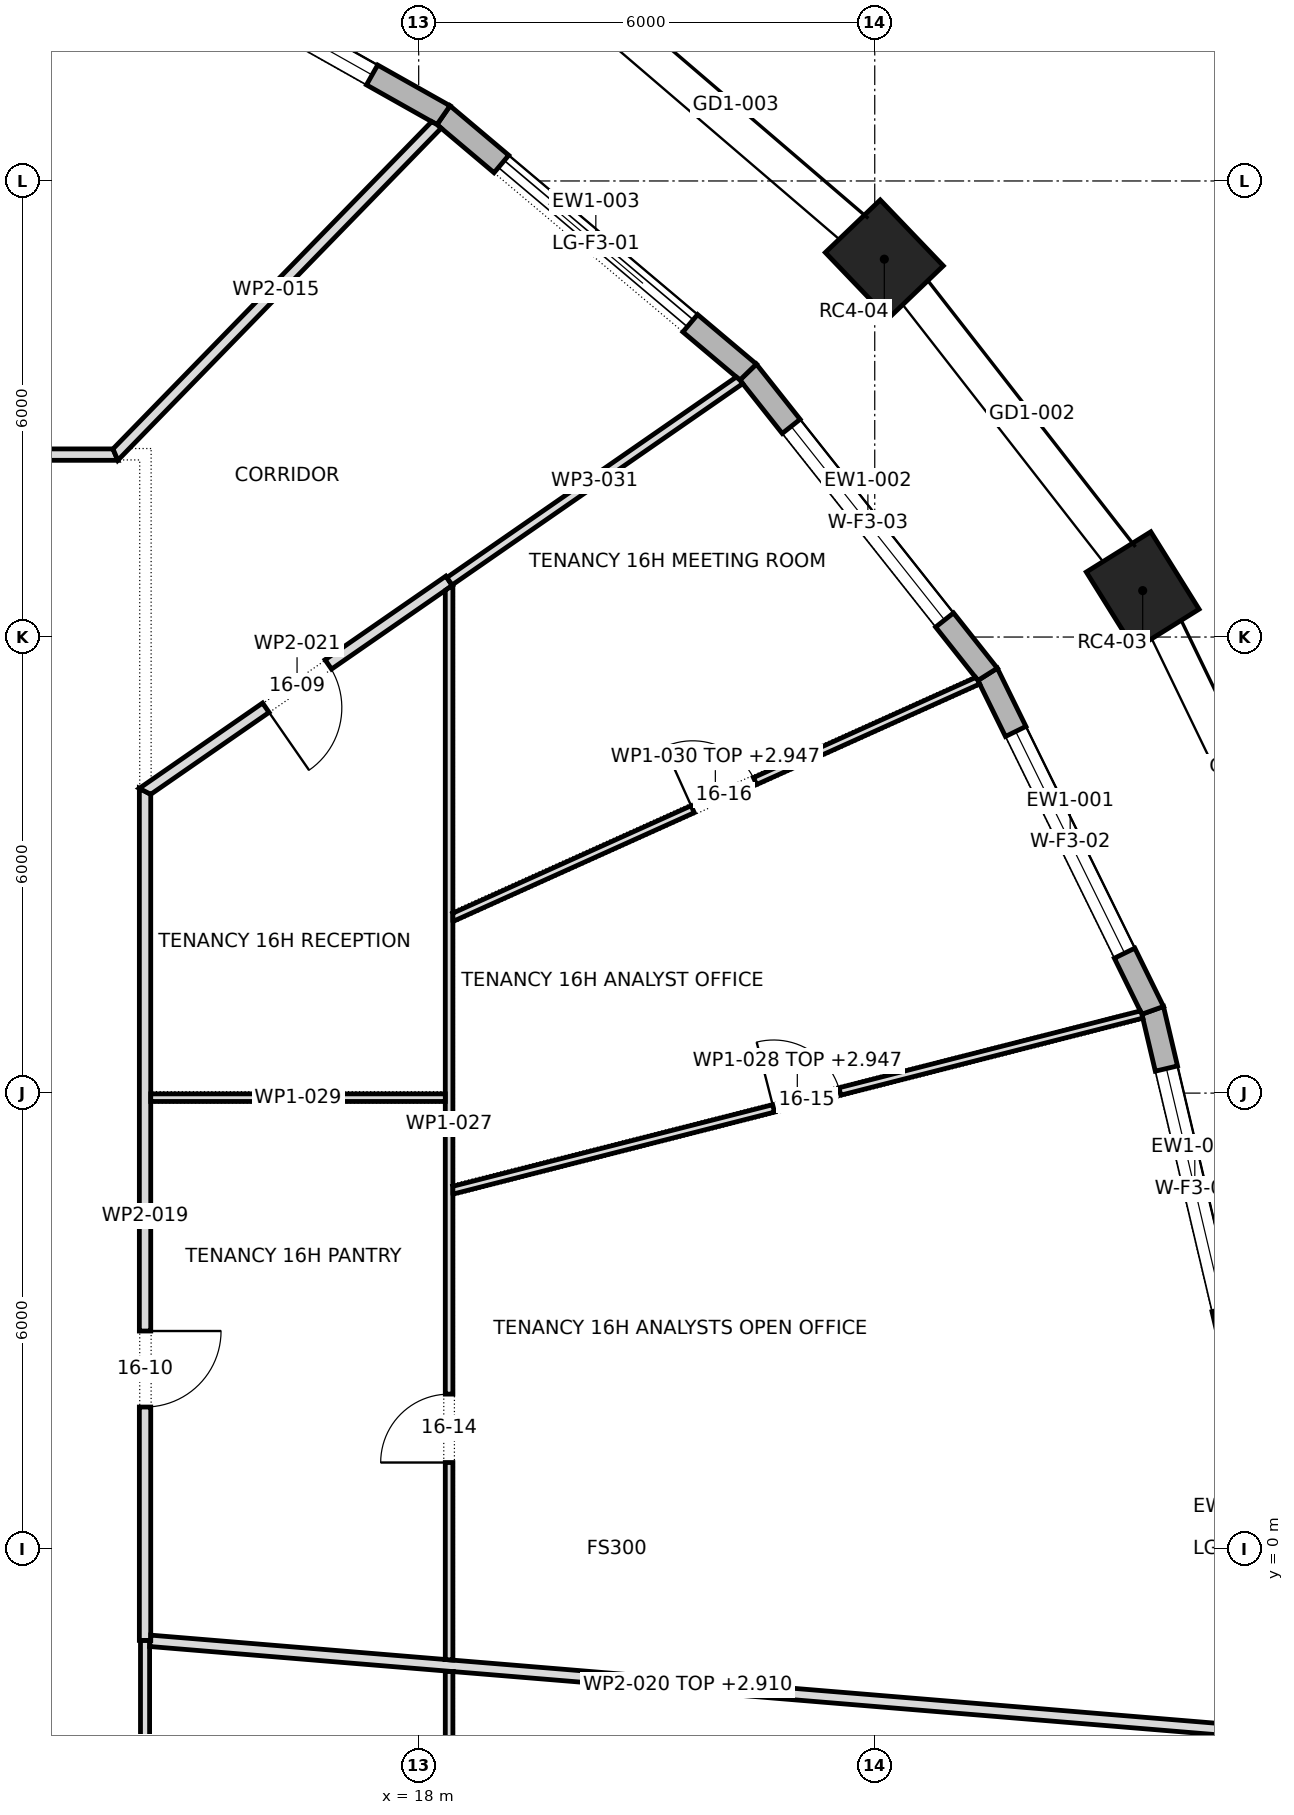
"""IFC4 building model, lengths in metres.
Left out: names, types, materials, properties, quantities, classifications, styles, units other than length and angle.
Written with IfcOpenShell. Run it as: python <this file> out.ifc"""

import sys

from ifc_helpers import new_model, si_unit, direction, frame, frame_2d, origin, origin_2d, place, context, subcontext, project, spatial, polyline, rectangle, outline, extrude, element, fill, save


model = new_model("IFC4")
c1 = context("Model", 3, precision=1e-05, world=origin(), true_north=direction((0.0, 1.0)))
c2 = subcontext(c1, "Body", "Model", "MODEL_VIEW")
j1 = project(units=[si_unit("LENGTHUNIT", "METRE"), si_unit("PLANEANGLEUNIT", "RADIAN")], contexts=[c1])
p1 = place(None, origin())
s1 = spatial("IfcSite", under=j1, at=p1, CompositionType="ELEMENT")
p2 = place(p1, origin())
s2 = spatial("IfcBuilding", under=s1, at=p2, CompositionType="ELEMENT")
p3 = place(p2, frame((0.0, 0.0, 234.9)))
s3 = spatial("IfcBuildingStorey", under=s2, at=p3, CompositionType="ELEMENT", Elevation=234.9)
for number, where, z_axis, x_axis in (
    (1, (27.525, 12.611, 0.0), (0.0, 0.0, 1.0), (-0.529, 0.849, 0.0)),
    (2, (24.126, 16.971, 0.0), (0.0, 0.0, 1.0), (-0.692, 0.722, 0.0)),
):
    element("IfcColumn", number, at=place(p3, frame(where, z_axis=z_axis, x_axis=x_axis)), inside=s3, PredefinedType="COLUMN", context=c2, shape_type="SweptSolid", body=[
        extrude(rectangle(XDim=1.2, YDim=1.0, at=origin_2d()), origin(), (0.0, 0.0, 1.0), 4.0),
    ])
p4 = place(p3, frame((28.764, 2.394, 0.0), z_axis=(0.0, 0.0, 1.0), x_axis=(-0.229617574796, 0.97328093033, 0.0)))
e3 = element("IfcWall", 3, at=p4, inside=s3, PredefinedType="STANDARD", context=c2, shape_type="SweptSolid", body=[
    extrude(outline(polyline([(-0.017, -0.15), (4.841, -0.15), (4.807, 0.15), (0.017, 0.15), (-0.017, -0.15)])), origin(), (0.0, 0.0, 1.0), 3.7),
])
p5 = place(p4, frame((0.787, 0.0, 0.6)))
e4 = element("IfcOpeningElement", 4, at=p5, cuts=e3, PredefinedType="OPENING", context=c2, shape_type="SweptSolid", body=[
    extrude(rectangle(XDim=3.25, YDim=2.65, at=frame_2d((1.625, 1.325))), frame((0.0, 0.162, 0.0), z_axis=(0.0, -1.0, 0.0), x_axis=(1.0, 0.0, 0.0)), (0.0, 0.0, 1.0), 0.324),
])
p6 = place(p3, frame((27.656, 7.089, 0.0), z_axis=(0.0, 0.0, 1.0), x_axis=(-0.440857641837, 0.897577038272, 0.0)))
e5 = element("IfcWall", 5, at=p6, inside=s3, PredefinedType="STANDARD", context=c2, shape_type="SweptSolid", body=[
    extrude(outline(polyline([(-0.017, -0.15), (4.941, -0.15), (4.909, 0.15), (0.017, 0.15), (-0.017, -0.15)])), origin(), (0.0, 0.0, 1.0), 3.7),
])
p7 = place(p6, frame((0.838, 0.0, 0.6)))
e6 = element("IfcOpeningElement", 6, at=p7, cuts=e5, PredefinedType="OPENING", context=c2, shape_type="SweptSolid", body=[
    extrude(rectangle(XDim=3.25, YDim=2.65, at=frame_2d((1.625, 1.325))), frame((0.0, 0.162, 0.0), z_axis=(0.0, -1.0, 0.0), x_axis=(1.0, 0.0, 0.0)), (0.0, 0.0, 1.0), 0.324),
])
p8 = place(p3, frame((25.485, 11.51, 0.0), z_axis=(0.0, 0.0, 1.0), x_axis=(-0.621084984443, 0.783743224596, 0.0)))
e7 = element("IfcWall", 7, at=p8, inside=s3, PredefinedType="STANDARD", context=c2, shape_type="SweptSolid", body=[
    extrude(outline(polyline([(-0.016, -0.15), (5.088, -0.15), (5.058, 0.15), (0.016, 0.15), (-0.016, -0.15)])), origin(), (0.0, 0.0, 1.0), 3.7),
])
p9 = place(p8, frame((0.912, 0.0, 0.6)))
e8 = element("IfcOpeningElement", 8, at=p9, cuts=e7, PredefinedType="OPENING", context=c2, shape_type="SweptSolid", body=[
    extrude(rectangle(XDim=3.25, YDim=2.65, at=frame_2d((1.625, 1.325))), frame((0.0, 0.162, 0.0), z_axis=(0.0, -1.0, 0.0), x_axis=(1.0, 0.0, 0.0)), (0.0, 0.0, 1.0), 0.324),
])
p10 = place(p3, frame((22.334, 15.486, 0.0), z_axis=(0.0, 0.0, 1.0), x_axis=(-0.764475071601, 0.644653290459, 0.0)))
e9 = element("IfcWall", 9, at=p10, inside=s3, PredefinedType="STANDARD", context=c2, shape_type="SweptSolid", body=[
    extrude(outline(polyline([(-0.015, -0.15), (5.257, -0.15), (5.229, 0.15), (0.015, 0.15), (-0.015, -0.15)])), origin(), (0.0, 0.0, 1.0), 3.7),
])
p11 = place(p10, frame((0.996, 0.0, 0.0)))
e10 = element("IfcOpeningElement", 10, at=p11, cuts=e9, PredefinedType="OPENING", context=c2, shape_type="SweptSolid", body=[
    extrude(rectangle(XDim=3.25, YDim=3.25, at=frame_2d((1.625, 1.625))), frame((0.0, 0.162, 0.0), z_axis=(0.0, -1.0, 0.0), x_axis=(1.0, 0.0, 0.0)), (0.0, 0.0, 1.0), 0.324),
])
p12 = place(p3, frame((18.326, 18.865, 0.0), z_axis=(0.0, 0.0, 1.0), x_axis=(-0.871225596594, 0.490882837181, 0.0)))
e11 = element("IfcWall", 11, at=p12, inside=s3, PredefinedType="STANDARD", context=c2, shape_type="SweptSolid", body=[
    extrude(outline(polyline([(-0.014, -0.15), (5.42, -0.15), (5.393, 0.15), (0.014, 0.15), (-0.014, -0.15)])), origin(), (0.0, 0.0, 1.0), 3.7),
])
p13 = place(p12, frame((1.078, 0.0, 0.6)))
e12 = element("IfcOpeningElement", 12, at=p13, cuts=e11, PredefinedType="OPENING", context=c2, shape_type="SweptSolid", body=[
    extrude(rectangle(XDim=3.25, YDim=2.65, at=frame_2d((1.625, 1.325))), frame((0.0, 0.162, 0.0), z_axis=(0.0, -1.0, 0.0), x_axis=(1.0, 0.0, 0.0)), (0.0, 0.0, 1.0), 0.324),
])
p14 = place(p3, frame((27.656, -7.089, 0.0), z_axis=(0.0, 0.0, 1.0), x_axis=(0.229617574796, 0.97328093033, 0.0)))
e13 = element("IfcWall", 13, at=p14, inside=s3, PredefinedType="STANDARD", context=c2, shape_type="SweptSolid", body=[
    extrude(outline(polyline([(-0.017, -0.15), (4.841, -0.15), (4.807, 0.15), (0.017, 0.15), (-0.017, -0.15)])), origin(), (0.0, 0.0, 1.0), 3.7),
])
p15 = place(p14, frame((0.787, 0.0, 0.6)))
e14 = element("IfcOpeningElement", 14, at=p15, cuts=e13, PredefinedType="OPENING", context=c2, shape_type="SweptSolid", body=[
    extrude(rectangle(XDim=3.25, YDim=2.65, at=frame_2d((1.625, 1.325))), frame((0.0, 0.162, 0.0), z_axis=(0.0, -1.0, 0.0), x_axis=(1.0, 0.0, 0.0)), (0.0, 0.0, 1.0), 0.324),
])
p16 = place(p3, frame((-14.042, 14.4, 0.0), z_axis=(0.0, 0.0, 1.0), x_axis=(1.0, 0.0, 0.0)))
e15 = element("IfcWall", 15, at=p16, inside=s3, PredefinedType="PARTITIONING", context=c2, shape_type="SweptSolid", body=[
    extrude(outline(polyline([(0.0, -0.075), (1.872, -0.075), (3.745, -0.075), (5.617, -0.075), (7.489, -0.075), (9.361, -0.075), (11.233, -0.075), (13.106, -0.075), (14.978, -0.075), (16.85, -0.075), (18.722, -0.075), (20.594, -0.075), (22.467, -0.075), (24.339, -0.075), (26.211, -0.075), (28.083, -0.075), (28.02, 0.075), (26.023, 0.075), (24.026, 0.075), (22.029, 0.075), (20.032, 0.075), (18.036, 0.075), (16.039, 0.075), (14.042, 0.075), (12.045, 0.075), (10.048, 0.075), (8.051, 0.075), (6.054, 0.075), (4.057, 0.075), (2.06, 0.075), (0.063, 0.075), (0.0, -0.075)])), origin(), (0.0, 0.0, 1.0), 3.7),
])
p17 = place(p16, frame((13.142, 0.0, 0.0)))
e16 = element("IfcOpeningElement", 16, at=p17, cuts=e15, PredefinedType="OPENING", context=c2, shape_type="SweptSolid", body=[
    extrude(rectangle(XDim=1.8, YDim=2.1, at=frame_2d((0.9, 1.05))), frame((0.0, 0.087, 0.0), z_axis=(0.0, -1.0, 0.0), x_axis=(1.0, 0.0, 0.0)), (0.0, 0.0, 1.0), 0.174),
])
p18 = place(p3, frame((13.988, 14.377, 0.0), z_axis=(0.0, 0.0, 1.0), x_axis=(0.697616683155, 0.716471188105, 0.0)))
e17 = element("IfcWall", 17, at=p18, inside=s3, PredefinedType="PARTITIONING", context=c2, shape_type="SweptSolid", body=[
    extrude(outline(polyline([(6.099, -0.075), (6.099, -0.073), (6.094, -0.002), (6.073, 0.075), (4.571, 0.075), (3.068, 0.075), (1.566, 0.075), (0.063, 0.075), (0.032, 0.0), (0.0, -0.075), (1.525, -0.075), (3.05, -0.075), (4.574, -0.075), (6.099, -0.075)])), origin(), (0.0, 0.0, 1.0), 3.7),
])
p19 = place(p3, frame((14.4, -1.2, 0.0), z_axis=(0.0, 0.0, 1.0), x_axis=(0.0, -1.0, 0.0)))
e18 = element("IfcWall", 18, at=p19, inside=s3, PredefinedType="PARTITIONING", context=c2, shape_type="SweptSolid", body=[
    extrude(rectangle(XDim=3.9, YDim=0.12, at=frame_2d((1.95, 0.0))), origin(), (0.0, 0.0, 1.0), 3.7),
])
p20 = place(p19, frame((1.45, 0.0, 0.0)))
e19 = element("IfcOpeningElement", 19, at=p20, cuts=e18, PredefinedType="OPENING", context=c2, shape_type="SweptSolid", body=[
    extrude(rectangle(XDim=1.0, YDim=2.1, at=frame_2d((0.5, 1.05))), frame((0.0, 0.072, 0.0), z_axis=(0.0, -1.0, 0.0), x_axis=(1.0, 0.0, 0.0)), (0.0, 0.0, 1.0), 0.144),
])
p21 = place(p3, frame((14.4, -1.2, 0.0), z_axis=(0.0, 0.0, 1.0), x_axis=(0.0, 1.0, 0.0)))
e20 = element("IfcWall", 20, at=p21, inside=s3, PredefinedType="PARTITIONING", context=c2, shape_type="SweptSolid", body=[
    extrude(outline(polyline([(0.0, -0.075), (1.855, -0.075), (3.71, -0.075), (5.565, -0.075), (7.42, -0.075), (9.276, -0.075), (11.131, -0.075), (11.209, 0.075), (11.209, 0.075), (9.341, 0.075), (7.473, 0.075), (5.604, 0.075), (3.736, 0.075), (1.868, 0.075), (0.0, 0.075), (0.0, -0.075)])), origin(), (0.0, 0.0, 1.0), 3.7),
])
p22 = place(p21, frame((3.07, 0.0, 0.0)))
e21 = element("IfcOpeningElement", 21, at=p22, cuts=e20, PredefinedType="OPENING", context=c2, shape_type="SweptSolid", body=[
    extrude(rectangle(XDim=1.0, YDim=2.1, at=frame_2d((0.5, 1.05))), frame((0.0, 0.087, 0.0), z_axis=(0.0, -1.0, 0.0), x_axis=(1.0, 0.0, 0.0)), (0.0, 0.0, 1.0), 0.174),
])
p23 = place(p3, frame((14.466, -1.206, 0.0), z_axis=(0.0, 0.0, 1.0), x_axis=(0.996598124583, -0.082414671491, 0.0)))
e22 = element("IfcWall", 22, at=p23, inside=s3, PredefinedType="PARTITIONING", context=c2, shape_type="SweptSolid", body=[
    extrude(outline(polyline([(0.0, -0.075), (1.334, -0.075), (2.667, -0.075), (4.001, -0.075), (4.003, -0.075), (4.003, -0.075), (5.7, -0.075), (7.397, -0.075), (9.094, -0.075), (10.791, -0.075), (12.488, -0.075), (14.185, -0.075), (14.19, -0.044), (14.19, 0.075), (12.475, 0.075), (10.761, 0.075), (9.046, 0.075), (7.332, 0.075), (5.617, 0.075), (3.903, 0.075), (3.891, 0.074), (3.891, 0.075), (1.947, 0.075), (0.002, 0.075), (0.008, 0.006), (0.0, 0.006), (0.0, -0.075)])), origin(), (0.0, 0.0, 1.0), 2.91),
])
p24 = place(p3, frame((14.368, 9.948, 0.0), z_axis=(0.0, 0.0, 1.0), x_axis=(0.822102584422, 0.56933938972, 0.0)))
e23 = element("IfcWall", 23, at=p24, inside=s3, PredefinedType="PARTITIONING", context=c2, shape_type="SweptSolid", body=[
    extrude(outline(polyline([(4.905, 0.075), (3.27, 0.075), (1.635, 0.075), (0.0, 0.075), (0.079, -0.075), (1.688, -0.075), (3.296, -0.075), (4.905, -0.075), (4.905, 0.075)])), origin(), (0.0, 0.0, 1.0), 3.7),
])
p25 = place(p24, frame((1.972, 0.0, 0.0)))
e24 = element("IfcOpeningElement", 24, at=p25, cuts=e23, PredefinedType="OPENING", context=c2, shape_type="SweptSolid", body=[
    extrude(rectangle(XDim=1.0, YDim=2.1, at=frame_2d((0.5, 1.05))), frame((0.0, 0.087, 0.0), z_axis=(0.0, -1.0, 0.0), x_axis=(1.0, 0.0, 0.0)), (0.0, 0.0, 1.0), 0.174),
])
p26 = place(p3, frame((18.4, -12.73, 0.0), z_axis=(0.0, 0.0, 1.0), x_axis=(0.0, 1.0, 0.0)))
e25 = element("IfcWall", 25, at=p26, inside=s3, PredefinedType="PARTITIONING", context=c2, shape_type="SweptSolid", body=[
    extrude(rectangle(XDim=11.12, YDim=0.1, at=frame_2d((5.56, 0.0))), origin(), (0.0, 0.0, 1.0), 3.7),
])
p27 = place(p26, frame((3.365, 0.0, 0.0)))
e26 = element("IfcOpeningElement", 26, at=p27, cuts=e25, PredefinedType="OPENING", context=c2, shape_type="SweptSolid", body=[
    extrude(rectangle(XDim=0.9, YDim=2.1, at=frame_2d((0.45, 1.05))), frame((0.0, 0.062, 0.0), z_axis=(0.0, -1.0, 0.0), x_axis=(1.0, 0.0, 0.0)), (0.0, 0.0, 1.0), 0.124),
])
p28 = place(p3, frame((18.4, -1.459, 0.0), z_axis=(0.0, 0.0, 1.0), x_axis=(0.0, 1.0, 0.0)))
e27 = element("IfcWall", 27, at=p28, inside=s3, PredefinedType="PARTITIONING", context=c2, shape_type="SweptSolid", body=[
    extrude(outline(polyline([(0.0, -0.05), (1.557, -0.05), (3.113, -0.05), (4.67, -0.05), (6.227, -0.05), (6.233, -0.048), (6.234, -0.05), (8.027, -0.05), (9.821, -0.05), (9.826, -0.048), (9.827, -0.05), (11.268, -0.05), (12.709, -0.05), (14.151, -0.05), (14.151, -0.05), (14.145, -0.04), (14.151, -0.036), (14.151, -0.034), (14.138, -0.043), (14.073, 0.05), (12.417, 0.05), (10.761, 0.05), (9.105, 0.05), (7.449, 0.05), (7.449, 0.05), (7.349, 0.05), (7.349, 0.05), (5.514, 0.05), (3.679, 0.05), (1.844, 0.05), (0.008, 0.05), (0.0, -0.048), (0.0, -0.05)])), origin(), (0.0, 0.0, 1.0), 3.7),
])
p29 = place(p28, frame((2.6, 0.0, 0.0)))
e28 = element("IfcOpeningElement", 28, at=p29, cuts=e27, PredefinedType="OPENING", context=c2, shape_type="SweptSolid", body=[
    extrude(rectangle(XDim=0.9, YDim=2.1, at=frame_2d((0.45, 1.05))), frame((0.0, 0.062, 0.0), z_axis=(0.0, -1.0, 0.0), x_axis=(1.0, 0.0, 0.0)), (0.0, 0.0, 1.0), 0.124),
])
p30 = place(p3, frame((18.438, 4.719, 0.0), z_axis=(0.0, 0.0, 1.0), x_axis=(0.968975503795, 0.247156778269, 0.0)))
e29 = element("IfcWall", 29, at=p30, inside=s3, PredefinedType="PARTITIONING", context=c2, shape_type="SweptSolid", body=[
    extrude(outline(polyline([(9.367, -0.05), (9.367, 0.008), (9.358, 0.05), (7.492, 0.05), (5.625, 0.05), (3.759, 0.05), (1.892, 0.05), (0.025, 0.05), (0.0, -0.05), (0.0, -0.05), (1.874, -0.05), (3.747, -0.05), (5.62, -0.05), (7.494, -0.05), (9.367, -0.05)])), origin(), (0.0, 0.0, 1.0), 2.947),
])
p31 = place(p30, frame((4.367, 0.0, 0.0)))
e30 = element("IfcOpeningElement", 30, at=p31, cuts=e29, PredefinedType="OPENING", context=c2, shape_type="SweptSolid", body=[
    extrude(rectangle(XDim=0.9, YDim=2.1, at=frame_2d((0.45, 1.05))), frame((0.0, 0.062, 0.0), z_axis=(0.0, -1.0, 0.0), x_axis=(1.0, 0.0, 0.0)), (0.0, 0.0, 1.0), 0.124),
])
p32 = place(p3, frame((18.35, 5.94, 0.0), z_axis=(0.0, 0.0, 1.0), x_axis=(-1.0, 0.0, 0.0)))
e31 = element("IfcWall", 31, at=p32, inside=s3, PredefinedType="PARTITIONING", context=c2, shape_type="SweptSolid", body=[
    extrude(rectangle(XDim=3.875, YDim=0.1, at=frame_2d((1.938, 0.0))), origin(), (0.0, 0.0, 1.0), 3.7),
])
p33 = place(p3, frame((18.43, 8.303, 0.0), z_axis=(0.0, 0.0, 1.0), x_axis=(0.911623805038, 0.411025592985, 0.0)))
e32 = element("IfcWall", 32, at=p33, inside=s3, PredefinedType="PARTITIONING", context=c2, shape_type="SweptSolid", body=[
    extrude(outline(polyline([(7.602, -0.05), (7.602, -0.045), (7.6, 0.002), (7.588, 0.05), (5.702, 0.05), (3.816, 0.05), (1.931, 0.05), (0.045, 0.05), (0.0, -0.049), (0.0, -0.05), (1.9, -0.05), (3.801, -0.05), (5.701, -0.05), (7.602, -0.05)])), origin(), (0.0, 0.0, 1.0), 2.947),
])
p34 = place(p33, frame((3.483, 0.0, 0.0)))
e33 = element("IfcOpeningElement", 33, at=p34, cuts=e32, PredefinedType="OPENING", context=c2, shape_type="SweptSolid", body=[
    extrude(rectangle(XDim=0.9, YDim=2.1, at=frame_2d((0.45, 1.05))), frame((0.0, 0.062, 0.0), z_axis=(0.0, -1.0, 0.0), x_axis=(1.0, 0.0, 0.0)), (0.0, 0.0, 1.0), 0.124),
])
p35 = place(p3, frame((18.405, 12.733, 0.0), z_axis=(0.0, 0.0, 1.0), x_axis=(0.821978662859, 0.569518285751, 0.0)))
e34 = element("IfcWall", 34, at=p35, inside=s3, PredefinedType="PARTITIONING", context=c2, shape_type="SweptSolid", body=[
    extrude(outline(polyline([(4.652, -0.06), (4.652, -0.055), (4.649, 0.0), (4.633, 0.06), (3.088, 0.06), (1.544, 0.06), (0.0, 0.06), (0.0, -0.051), (0.013, -0.06), (1.56, -0.06), (3.106, -0.06), (4.652, -0.06)])), origin(), (0.0, 0.0, 1.0), 3.7),
])
p36 = place(p5, origin())
e35 = element("IfcWindow", 35, at=p36, inside=s3, PartitioningType="TRIPLE_PANEL_VERTICAL", PredefinedType="WINDOW", context=c2, shape_type="SweptSolid", body=[
    extrude(rectangle(XDim=3.25, YDim=2.65, at=frame_2d((1.625, 1.325))), frame((0.0, 0.03, 0.0), z_axis=(0.0, -1.0, 0.0), x_axis=(1.0, 0.0, 0.0)), (0.0, 0.0, 1.0), 0.06),
])
fill(e4, e35)
p37 = place(p7, origin())
e36 = element("IfcWindow", 36, at=p37, inside=s3, PartitioningType="TRIPLE_PANEL_VERTICAL", PredefinedType="WINDOW", context=c2, shape_type="SweptSolid", body=[
    extrude(rectangle(XDim=3.25, YDim=2.65, at=frame_2d((1.625, 1.325))), frame((0.0, 0.03, 0.0), z_axis=(0.0, -1.0, 0.0), x_axis=(1.0, 0.0, 0.0)), (0.0, 0.0, 1.0), 0.06),
])
fill(e6, e36)
p38 = place(p9, origin())
e37 = element("IfcWindow", 37, at=p38, inside=s3, PartitioningType="TRIPLE_PANEL_VERTICAL", PredefinedType="WINDOW", context=c2, shape_type="SweptSolid", body=[
    extrude(rectangle(XDim=3.25, YDim=2.65, at=frame_2d((1.625, 1.325))), frame((0.0, 0.03, 0.0), z_axis=(0.0, -1.0, 0.0), x_axis=(1.0, 0.0, 0.0)), (0.0, 0.0, 1.0), 0.06),
])
fill(e8, e37)
p39 = place(p11, origin())
e38 = element("IfcDoor", 38, at=p39, inside=s3, OperationType="DOUBLE_DOOR_SLIDING", PredefinedType="DOOR", context=c2, shape_type="SweptSolid", body=[
    extrude(rectangle(XDim=3.25, YDim=3.25, at=frame_2d((1.625, 1.625))), frame((0.0, 0.025, 0.0), z_axis=(0.0, -1.0, 0.0), x_axis=(1.0, 0.0, 0.0)), (0.0, 0.0, 1.0), 0.05),
])
fill(e10, e38)
p40 = place(p13, origin())
e39 = element("IfcWindow", 39, at=p40, inside=s3, PartitioningType="TRIPLE_PANEL_VERTICAL", PredefinedType="WINDOW", context=c2, shape_type="SweptSolid", body=[
    extrude(rectangle(XDim=3.25, YDim=2.65, at=frame_2d((1.625, 1.325))), frame((0.0, 0.03, 0.0), z_axis=(0.0, -1.0, 0.0), x_axis=(1.0, 0.0, 0.0)), (0.0, 0.0, 1.0), 0.06),
])
fill(e12, e39)
p41 = place(p25, frame((1.0, 0.0, 0.0), z_axis=(0.0, 0.0, 1.0), x_axis=(-1.0, 0.0, 0.0)))
e40 = element("IfcDoor", 40, at=p41, inside=s3, OperationType="SINGLE_SWING_LEFT", PredefinedType="DOOR", context=c2, shape_type="SweptSolid", body=[
    extrude(rectangle(XDim=1.0, YDim=2.1, at=frame_2d((0.5, 1.05))), frame((0.0, 0.025, 0.0), z_axis=(0.0, -1.0, 0.0), x_axis=(1.0, 0.0, 0.0)), (0.0, 0.0, 1.0), 0.05),
])
fill(e24, e40)
p42 = place(p22, frame((1.0, 0.0, 0.0), z_axis=(0.0, 0.0, 1.0), x_axis=(-1.0, 0.0, 0.0)))
e41 = element("IfcDoor", 41, at=p42, inside=s3, OperationType="SINGLE_SWING_RIGHT", PredefinedType="DOOR", context=c2, shape_type="SweptSolid", body=[
    extrude(rectangle(XDim=1.0, YDim=2.1, at=frame_2d((0.5, 1.05))), frame((0.0, 0.025, 0.0), z_axis=(0.0, -1.0, 0.0), x_axis=(1.0, 0.0, 0.0)), (0.0, 0.0, 1.0), 0.05),
])
fill(e21, e41)
p43 = place(p29, origin())
e42 = element("IfcDoor", 42, at=p43, inside=s3, OperationType="SINGLE_SWING_RIGHT", PredefinedType="DOOR", context=c2, shape_type="SweptSolid", body=[
    extrude(rectangle(XDim=0.9, YDim=2.1, at=frame_2d((0.45, 1.05))), frame((0.0, 0.025, 0.0), z_axis=(0.0, -1.0, 0.0), x_axis=(1.0, 0.0, 0.0)), (0.0, 0.0, 1.0), 0.05),
])
fill(e28, e42)
p44 = place(p31, origin())
e43 = element("IfcDoor", 43, at=p44, inside=s3, OperationType="SINGLE_SWING_RIGHT", PredefinedType="DOOR", context=c2, shape_type="SweptSolid", body=[
    extrude(rectangle(XDim=0.9, YDim=2.1, at=frame_2d((0.45, 1.05))), frame((0.0, 0.025, 0.0), z_axis=(0.0, -1.0, 0.0), x_axis=(1.0, 0.0, 0.0)), (0.0, 0.0, 1.0), 0.05),
])
fill(e30, e43)
p45 = place(p34, origin())
e44 = element("IfcDoor", 44, at=p45, inside=s3, OperationType="SINGLE_SWING_RIGHT", PredefinedType="DOOR", context=c2, shape_type="SweptSolid", body=[
    extrude(rectangle(XDim=0.9, YDim=2.1, at=frame_2d((0.45, 1.05))), frame((0.0, 0.025, 0.0), z_axis=(0.0, -1.0, 0.0), x_axis=(1.0, 0.0, 0.0)), (0.0, 0.0, 1.0), 0.05),
])
fill(e33, e44)
save(model, sys.argv[1])
